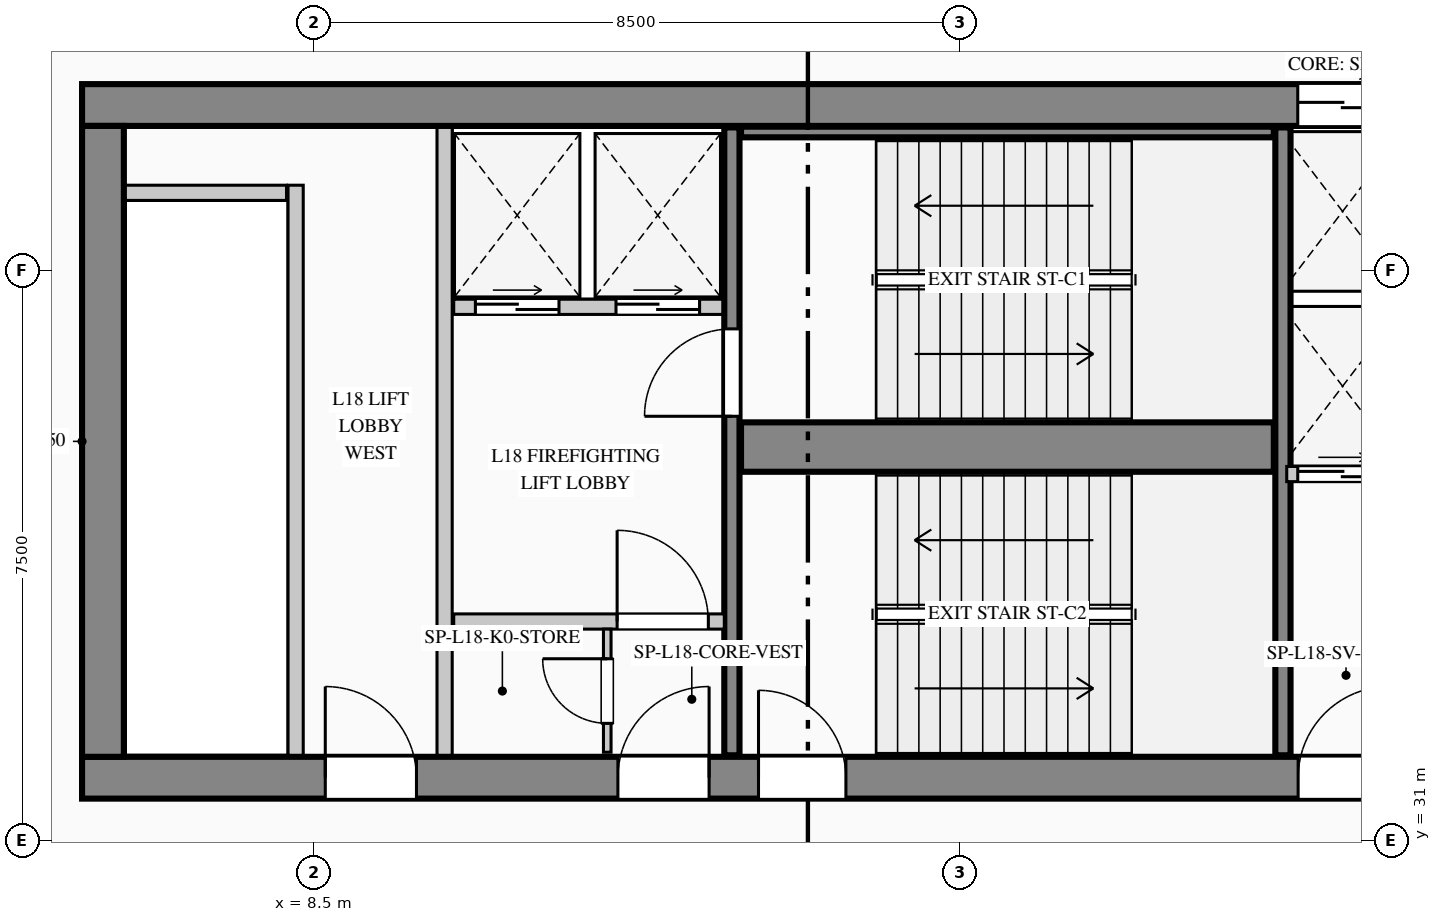
"""IFC4 building model, lengths in metres.
Left out: names, types, materials, properties, quantities, classifications, styles, units other than length and angle.
Written with IfcOpenShell. Run it as: python <this file> out.ifc"""

import sys

from ifc_helpers import new_model, si_unit, direction, frame, frame_2d, origin, place, context, subcontext, project, spatial, rectangle, extrude, element, fill, save


model = new_model("IFC4")
c1 = context("Model", 3, precision=1e-05, world=origin(), true_north=direction((0.0, 1.0)))
c2 = subcontext(c1, "Body", "Model", "MODEL_VIEW")
j1 = project(units=[si_unit("LENGTHUNIT", "METRE"), si_unit("PLANEANGLEUNIT", "RADIAN")], contexts=[c1])
p1 = place(None, origin())
s1 = spatial("IfcSite", under=j1, at=p1, CompositionType="ELEMENT")
p2 = place(p1, origin())
s2 = spatial("IfcBuilding", under=s1, at=p2, CompositionType="ELEMENT")
p3 = place(p2, frame((0.0, 0.0, 79.8)))
s3 = spatial("IfcBuildingStorey", under=s2, at=p3, CompositionType="ELEMENT", Elevation=79.8)
p4 = place(p3, frame((5.45, 40.675, 0.0), z_axis=(0.0, 0.0, 1.0), x_axis=(1.0, 0.0, 0.0)))
e1 = element("IfcWall", 1, at=p4, inside=s3, PredefinedType="SHEAR", context=c2, shape_type="SweptSolid", body=[
    extrude(rectangle(XDim=17.95, YDim=0.55, at=frame_2d((8.975, 0.0))), origin(), (0.0, 0.0, 1.0), 4.4),
])
p5 = place(p4, frame((15.995, 0.0, 0.0)))
e2 = element("IfcOpeningElement", 2, at=p5, cuts=e1, PredefinedType="OPENING", context=c2, shape_type="SweptSolid", body=[
    extrude(rectangle(XDim=1.18, YDim=2.25, at=frame_2d((0.59, 1.125))), frame((0.0, 0.285, 0.0), z_axis=(0.0, -1.0, 0.0), x_axis=(1.0, 0.0, 0.0)), (0.0, 0.0, 1.0), 0.57),
])
p6 = place(p3, frame((5.45, 31.825, 0.0), z_axis=(0.0, 0.0, 1.0), x_axis=(1.0, 0.0, 0.0)))
e3 = element("IfcWall", 3, at=p6, inside=s3, PredefinedType="SHEAR", context=c2, shape_type="SweptSolid", body=[
    extrude(rectangle(XDim=17.95, YDim=0.55, at=frame_2d((8.975, 0.0))), origin(), (0.0, 0.0, 1.0), 4.4),
])
p7 = place(p6, frame((3.2, 0.0, 0.0)))
e4 = element("IfcOpeningElement", 4, at=p7, cuts=e3, PredefinedType="OPENING", context=c2, shape_type="SweptSolid", body=[
    extrude(rectangle(XDim=1.2, YDim=2.2, at=frame_2d((0.6, 1.1))), frame((0.0, 0.285, 0.0), z_axis=(0.0, -1.0, 0.0), x_axis=(1.0, 0.0, 0.0)), (0.0, 0.0, 1.0), 0.57),
])
p8 = place(p6, frame((7.05, 0.0, 0.0)))
e5 = element("IfcOpeningElement", 5, at=p8, cuts=e3, PredefinedType="OPENING", context=c2, shape_type="SweptSolid", body=[
    extrude(rectangle(XDim=1.2, YDim=2.2, at=frame_2d((0.6, 1.1))), frame((0.0, 0.285, 0.0), z_axis=(0.0, -1.0, 0.0), x_axis=(1.0, 0.0, 0.0)), (0.0, 0.0, 1.0), 0.57),
])
p9 = place(p6, frame((8.9, 0.0, 0.0)))
e6 = element("IfcOpeningElement", 6, at=p9, cuts=e3, PredefinedType="OPENING", context=c2, shape_type="SweptSolid", body=[
    extrude(rectangle(XDim=1.15, YDim=2.2, at=frame_2d((0.575, 1.1))), frame((0.0, 0.285, 0.0), z_axis=(0.0, -1.0, 0.0), x_axis=(1.0, 0.0, 0.0)), (0.0, 0.0, 1.0), 0.57),
])
p10 = place(p6, frame((16.0, 0.0, 0.0)))
e7 = element("IfcOpeningElement", 7, at=p10, cuts=e3, PredefinedType="OPENING", context=c2, shape_type="SweptSolid", body=[
    extrude(rectangle(XDim=1.2, YDim=2.2, at=frame_2d((0.6, 1.1))), frame((0.0, 0.285, 0.0), z_axis=(0.0, -1.0, 0.0), x_axis=(1.0, 0.0, 0.0)), (0.0, 0.0, 1.0), 0.57),
])
p11 = place(p3, frame((5.725, 32.1, 0.0), z_axis=(0.0, 0.0, 1.0), x_axis=(0.0, 1.0, 0.0)))
e8 = element("IfcWall", 8, at=p11, inside=s3, PredefinedType="SHEAR", context=c2, shape_type="SweptSolid", body=[
    extrude(rectangle(XDim=8.3, YDim=0.55, at=frame_2d((4.15, 0.0))), origin(), (0.0, 0.0, 1.0), 4.4),
])
p12 = place(p3, frame((14.0, 32.12, 0.0), z_axis=(0.0, 0.0, 1.0), x_axis=(0.0, 1.0, 0.0)))
e9 = element("IfcWall", 9, at=p12, inside=s3, PredefinedType="SHEAR", context=c2, shape_type="SweptSolid", body=[
    extrude(rectangle(XDim=8.26, YDim=0.2, at=frame_2d((4.13, 0.0))), origin(), (0.0, 0.0, 1.0), 4.4),
])
p13 = place(p12, frame((4.46, 0.0, 0.0)))
e10 = element("IfcOpeningElement", 10, at=p13, cuts=e9, PredefinedType="OPENING", context=c2, shape_type="SweptSolid", body=[
    extrude(rectangle(XDim=1.15, YDim=2.2, at=frame_2d((0.575, 1.1))), frame((0.0, 0.11, 0.0), z_axis=(0.0, -1.0, 0.0), x_axis=(1.0, 0.0, 0.0)), (0.0, 0.0, 1.0), 0.22),
])
p14 = place(p3, frame((14.12, 36.175, 0.0), z_axis=(0.0, 0.0, 1.0), x_axis=(1.0, 0.0, 0.0)))
e11 = element("IfcWall", 11, at=p14, inside=s3, PredefinedType="SHEAR", context=c2, shape_type="SweptSolid", body=[
    extrude(rectangle(XDim=7.01, YDim=0.65, at=frame_2d((3.505, 0.0))), origin(), (0.0, 0.0, 1.0), 4.4),
])
p15 = place(p3, frame((21.25, 32.12, 0.0), z_axis=(0.0, 0.0, 1.0), x_axis=(0.0, 1.0, 0.0)))
e12 = element("IfcWall", 12, at=p15, inside=s3, PredefinedType="SHEAR", context=c2, shape_type="SweptSolid", body=[
    extrude(rectangle(XDim=8.26, YDim=0.2, at=frame_2d((4.13, 0.0))), origin(), (0.0, 0.0, 1.0), 4.4),
])
p16 = place(p3, frame((14.12, 40.32, 0.0), z_axis=(0.0, 0.0, 1.0), x_axis=(1.0, 0.0, 0.0)))
e13 = element("IfcWall", 13, at=p16, inside=s3, PredefinedType="SHEAR", context=c2, shape_type="SweptSolid", body=[
    extrude(rectangle(XDim=7.01, YDim=0.14, at=frame_2d((3.505, 0.0))), origin(), (0.0, 0.0, 1.0), 4.4),
])
p17 = place(p3, frame((8.523, 4.84, 0.0), z_axis=(0.0, 0.0, 1.0), x_axis=(-0.150394554312, 0.988626055712, 0.0)))
e14 = element("IfcWall", 14, at=p17, inside=s3, PredefinedType="STANDARD", context=c2, shape_type="SweptSolid", body=[
    extrude(rectangle(XDim=36.738, YDim=0.28, at=frame_2d((18.369, 0.0))), origin(), (0.0, 0.0, 1.0), 4.115),
])
p18 = place(p17, frame((22.612, 0.0, 0.9)))
e15 = element("IfcOpeningElement", 15, at=p18, cuts=e14, PredefinedType="OPENING", context=c2, shape_type="SweptSolid", body=[
    extrude(rectangle(XDim=1.8, YDim=2.1, at=frame_2d((0.9, 1.05))), frame((0.0, 0.15, 0.0), z_axis=(0.0, -1.0, 0.0), x_axis=(1.0, 0.0, 0.0)), (0.0, 0.0, 1.0), 0.3),
])
p19 = place(p3, frame((8.26, 32.12, 0.0), z_axis=(0.0, 0.0, 1.0), x_axis=(0.0, 1.0, 0.0)))
e16 = element("IfcWall", 16, at=p19, inside=s3, PredefinedType="PARTITIONING", context=c2, shape_type="SweptSolid", body=[
    extrude(rectangle(XDim=7.5, YDim=0.2, at=frame_2d((3.75, 0.0))), origin(), (0.0, 0.0, 1.0), 4.115),
])
p20 = place(p3, frame((6.02, 39.52, 0.0), z_axis=(0.0, 0.0, 1.0), x_axis=(1.0, 0.0, 0.0)))
e17 = element("IfcWall", 17, at=p20, inside=s3, PredefinedType="PARTITIONING", context=c2, shape_type="SweptSolid", body=[
    extrude(rectangle(XDim=2.12, YDim=0.2, at=frame_2d((1.06, 0.0))), origin(), (0.0, 0.0, 1.0), 4.115),
])
p21 = place(p3, frame((10.22, 32.12, 0.0), z_axis=(0.0, 0.0, 1.0), x_axis=(0.0, 1.0, 0.0)))
e18 = element("IfcWall", 18, at=p21, inside=s3, PredefinedType="PARTITIONING", context=c2, shape_type="SweptSolid", body=[
    extrude(rectangle(XDim=8.26, YDim=0.2, at=frame_2d((4.13, 0.0))), origin(), (0.0, 0.0, 1.0), 4.115),
])
p22 = place(p3, frame((10.34, 38.02, 0.0), z_axis=(0.0, 0.0, 1.0), x_axis=(1.0, 0.0, 0.0)))
e19 = element("IfcWall", 19, at=p22, inside=s3, PredefinedType="PARTITIONING", context=c2, shape_type="SweptSolid", body=[
    extrude(rectangle(XDim=3.54, YDim=0.2, at=frame_2d((1.77, 0.0))), origin(), (0.0, 0.0, 1.0), 4.115),
])
p23 = place(p22, frame((0.285, 0.0, 0.0)))
e20 = element("IfcOpeningElement", 20, at=p23, cuts=e19, PredefinedType="OPENING", context=c2, shape_type="SweptSolid", body=[
    extrude(rectangle(XDim=1.1, YDim=2.2, at=frame_2d((0.55, 1.1))), frame((0.0, 0.11, 0.0), z_axis=(0.0, -1.0, 0.0), x_axis=(1.0, 0.0, 0.0)), (0.0, 0.0, 1.0), 0.22),
])
p24 = place(p22, frame((2.135, 0.0, 0.0)))
e21 = element("IfcOpeningElement", 21, at=p24, cuts=e19, PredefinedType="OPENING", context=c2, shape_type="SweptSolid", body=[
    extrude(rectangle(XDim=1.1, YDim=2.2, at=frame_2d((0.55, 1.1))), frame((0.0, 0.11, 0.0), z_axis=(0.0, -1.0, 0.0), x_axis=(1.0, 0.0, 0.0)), (0.0, 0.0, 1.0), 0.22),
])
p25 = place(p3, frame((10.34, 33.88, 0.0), z_axis=(0.0, 0.0, 1.0), x_axis=(1.0, 0.0, 0.0)))
e22 = element("IfcWall", 22, at=p25, inside=s3, PredefinedType="PARTITIONING", context=c2, shape_type="SweptSolid", body=[
    extrude(rectangle(XDim=3.56, YDim=0.2, at=frame_2d((1.78, 0.0))), origin(), (0.0, 0.0, 1.0), 4.115),
])
p26 = place(p25, frame((2.15, 0.0, 0.0)))
e23 = element("IfcOpeningElement", 23, at=p26, cuts=e22, PredefinedType="OPENING", context=c2, shape_type="SweptSolid", body=[
    extrude(rectangle(XDim=1.2, YDim=2.2, at=frame_2d((0.6, 1.1))), frame((0.0, 0.11, 0.0), z_axis=(0.0, -1.0, 0.0), x_axis=(1.0, 0.0, 0.0)), (0.0, 0.0, 1.0), 0.22),
])
p27 = place(p3, frame((12.36, 32.16, 0.0), z_axis=(0.0, 0.0, 1.0), x_axis=(0.0, 1.0, 0.0)))
e24 = element("IfcWall", 24, at=p27, inside=s3, PredefinedType="PARTITIONING", context=c2, shape_type="SweptSolid", body=[
    extrude(rectangle(XDim=1.62, YDim=0.1, at=frame_2d((0.81, 0.0))), origin(), (0.0, 0.0, 1.0), 4.115),
])
p28 = place(p27, frame((0.38, 0.0, 0.0)))
e25 = element("IfcOpeningElement", 25, at=p28, cuts=e24, PredefinedType="OPENING", context=c2, shape_type="SweptSolid", body=[
    extrude(rectangle(XDim=0.85, YDim=2.1, at=frame_2d((0.425, 1.05))), frame((0.0, 0.06, 0.0), z_axis=(0.0, -1.0, 0.0), x_axis=(1.0, 0.0, 0.0)), (0.0, 0.0, 1.0), 0.12),
])
p29 = place(p3, frame((21.3, 35.82, 0.0), z_axis=(0.0, 0.0, 1.0), x_axis=(1.0, 0.0, 0.0)))
e26 = element("IfcWall", 26, at=p29, inside=s3, PredefinedType="PARTITIONING", context=c2, shape_type="SweptSolid", body=[
    extrude(rectangle(XDim=1.5, YDim=0.2, at=frame_2d((0.75, 0.0))), origin(), (0.0, 0.0, 1.0), 4.115),
])
p30 = place(p29, frame((0.145, 0.0, 0.0)))
e27 = element("IfcOpeningElement", 27, at=p30, cuts=e26, PredefinedType="OPENING", context=c2, shape_type="SweptSolid", body=[
    extrude(rectangle(XDim=1.18, YDim=2.25, at=frame_2d((0.59, 1.125))), frame((0.0, 0.11, 0.0), z_axis=(0.0, -1.0, 0.0), x_axis=(1.0, 0.0, 0.0)), (0.0, 0.0, 1.0), 0.22),
])
p31 = place(p7, origin())
e28 = element("IfcDoor", 28, at=p31, inside=s3, OperationType="SINGLE_SWING_LEFT", PredefinedType="DOOR", context=c2, shape_type="SweptSolid", body=[
    extrude(rectangle(XDim=1.2, YDim=2.2, at=frame_2d((0.6, 1.1))), frame((0.0, 0.025, 0.0), z_axis=(0.0, -1.0, 0.0), x_axis=(1.0, 0.0, 0.0)), (0.0, 0.0, 1.0), 0.05),
])
fill(e4, e28)
p32 = place(p8, origin())
e29 = element("IfcDoor", 29, at=p32, inside=s3, OperationType="SINGLE_SWING_RIGHT", PredefinedType="DOOR", context=c2, shape_type="SweptSolid", body=[
    extrude(rectangle(XDim=1.2, YDim=2.2, at=frame_2d((0.6, 1.1))), frame((0.0, 0.025, 0.0), z_axis=(0.0, -1.0, 0.0), x_axis=(1.0, 0.0, 0.0)), (0.0, 0.0, 1.0), 0.05),
])
fill(e5, e29)
p33 = place(p9, origin())
e30 = element("IfcDoor", 30, at=p33, inside=s3, OperationType="SINGLE_SWING_LEFT", PredefinedType="DOOR", context=c2, shape_type="SweptSolid", body=[
    extrude(rectangle(XDim=1.15, YDim=2.2, at=frame_2d((0.575, 1.1))), frame((0.0, 0.025, 0.0), z_axis=(0.0, -1.0, 0.0), x_axis=(1.0, 0.0, 0.0)), (0.0, 0.0, 1.0), 0.05),
])
fill(e6, e30)
p34 = place(p10, origin())
e31 = element("IfcDoor", 31, at=p34, inside=s3, OperationType="SINGLE_SWING_RIGHT", PredefinedType="DOOR", context=c2, shape_type="SweptSolid", body=[
    extrude(rectangle(XDim=1.2, YDim=2.2, at=frame_2d((0.6, 1.1))), frame((0.0, 0.025, 0.0), z_axis=(0.0, -1.0, 0.0), x_axis=(1.0, 0.0, 0.0)), (0.0, 0.0, 1.0), 0.05),
])
fill(e7, e31)
p35 = place(p26, origin())
e32 = element("IfcDoor", 32, at=p35, inside=s3, OperationType="SINGLE_SWING_LEFT", PredefinedType="DOOR", context=c2, shape_type="SweptSolid", body=[
    extrude(rectangle(XDim=1.2, YDim=2.2, at=frame_2d((0.6, 1.1))), frame((0.0, 0.025, 0.0), z_axis=(0.0, -1.0, 0.0), x_axis=(1.0, 0.0, 0.0)), (0.0, 0.0, 1.0), 0.05),
])
fill(e23, e32)
p36 = place(p28, origin())
e33 = element("IfcDoor", 33, at=p36, inside=s3, OperationType="SINGLE_SWING_RIGHT", PredefinedType="DOOR", context=c2, shape_type="SweptSolid", body=[
    extrude(rectangle(XDim=0.85, YDim=2.1, at=frame_2d((0.425, 1.05))), frame((0.0, 0.025, 0.0), z_axis=(0.0, -1.0, 0.0), x_axis=(1.0, 0.0, 0.0)), (0.0, 0.0, 1.0), 0.05),
])
fill(e25, e33)
p37 = place(p13, origin())
e34 = element("IfcDoor", 34, at=p37, inside=s3, OperationType="SINGLE_SWING_LEFT", PredefinedType="DOOR", context=c2, shape_type="SweptSolid", body=[
    extrude(rectangle(XDim=1.15, YDim=2.2, at=frame_2d((0.575, 1.1))), frame((0.0, 0.025, 0.0), z_axis=(0.0, -1.0, 0.0), x_axis=(1.0, 0.0, 0.0)), (0.0, 0.0, 1.0), 0.05),
])
fill(e10, e34)
p38 = place(p23, origin())
e35 = element("IfcDoor", 35, at=p38, inside=s3, OperationType="DOUBLE_DOOR_SLIDING", PredefinedType="DOOR", context=c2, shape_type="SweptSolid", body=[
    extrude(rectangle(XDim=1.1, YDim=2.2, at=frame_2d((0.55, 1.1))), frame((0.0, 0.025, 0.0), z_axis=(0.0, -1.0, 0.0), x_axis=(1.0, 0.0, 0.0)), (0.0, 0.0, 1.0), 0.05),
])
fill(e20, e35)
p39 = place(p24, origin())
e36 = element("IfcDoor", 36, at=p39, inside=s3, OperationType="DOUBLE_DOOR_SLIDING", PredefinedType="DOOR", context=c2, shape_type="SweptSolid", body=[
    extrude(rectangle(XDim=1.1, YDim=2.2, at=frame_2d((0.55, 1.1))), frame((0.0, 0.025, 0.0), z_axis=(0.0, -1.0, 0.0), x_axis=(1.0, 0.0, 0.0)), (0.0, 0.0, 1.0), 0.05),
])
fill(e21, e36)
p40 = place(p5, origin())
e37 = element("IfcDoor", 37, at=p40, inside=s3, OperationType="DOUBLE_DOOR_SLIDING", PredefinedType="DOOR", context=c2, shape_type="SweptSolid", body=[
    extrude(rectangle(XDim=1.18, YDim=2.25, at=frame_2d((0.59, 1.125))), frame((0.0, 0.025, 0.0), z_axis=(0.0, -1.0, 0.0), x_axis=(1.0, 0.0, 0.0)), (0.0, 0.0, 1.0), 0.05),
])
fill(e2, e37)
p41 = place(p30, origin())
e38 = element("IfcDoor", 38, at=p41, inside=s3, OperationType="DOUBLE_DOOR_SLIDING", PredefinedType="DOOR", context=c2, shape_type="SweptSolid", body=[
    extrude(rectangle(XDim=1.18, YDim=2.25, at=frame_2d((0.59, 1.125))), frame((0.0, 0.025, 0.0), z_axis=(0.0, -1.0, 0.0), x_axis=(1.0, 0.0, 0.0)), (0.0, 0.0, 1.0), 0.05),
])
fill(e27, e38)
save(model, sys.argv[1])
